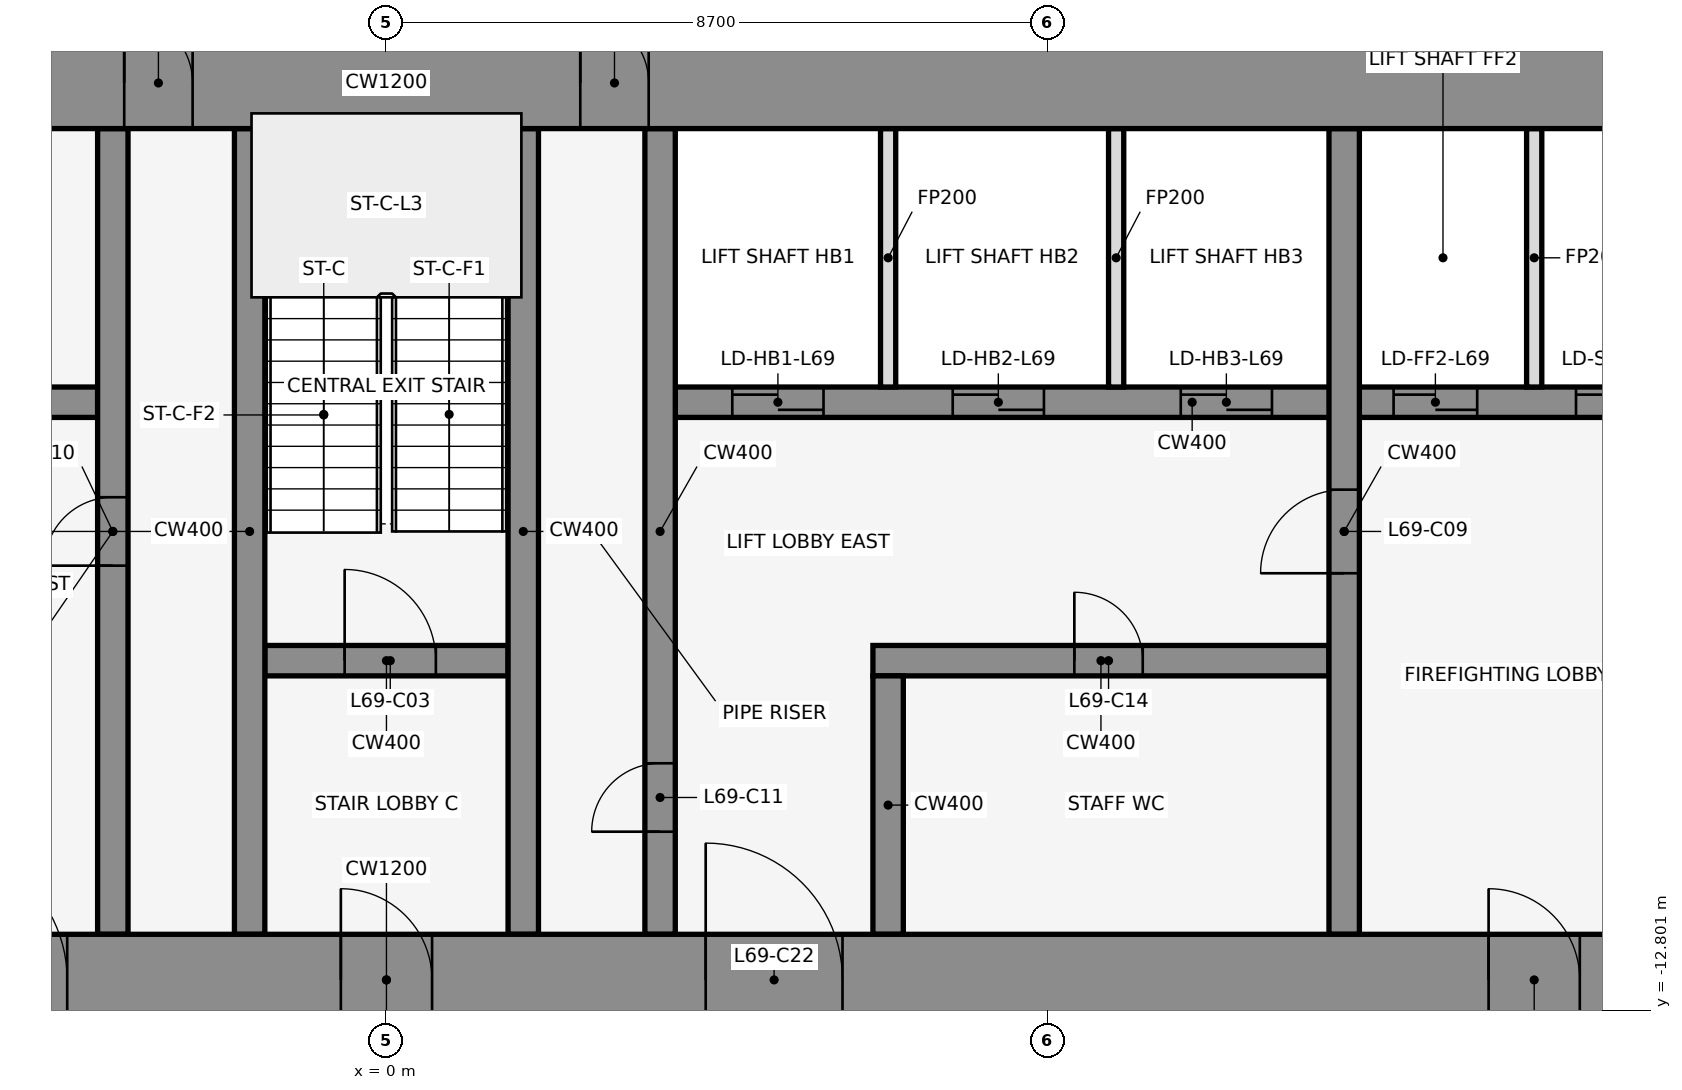
"""IFC4 building model, lengths in metres.
Left out: names, types, materials, properties, quantities, classifications, styles, units other than length and angle.
Written with IfcOpenShell. Run it as: python <this file> out.ifc"""

import sys

from ifc_helpers import new_model, si_unit, direction, frame, frame_2d, origin, place, context, subcontext, project, spatial, rectangle, extrude, element, fill, save


model = new_model("IFC4")
c1 = context("Model", 3, precision=1e-05, world=origin(), true_north=direction((0.0, 1.0)))
c2 = subcontext(c1, "Body", "Model", "MODEL_VIEW")
j1 = project(units=[si_unit("LENGTHUNIT", "METRE"), si_unit("PLANEANGLEUNIT", "RADIAN")], contexts=[c1])
p1 = place(None, origin())
s1 = spatial("IfcSite", under=j1, at=p1, CompositionType="ELEMENT")
p2 = place(p1, origin())
s2 = spatial("IfcBuilding", under=s1, at=p2, CompositionType="ELEMENT")
p3 = place(p2, frame((0.0, 0.0, 306.5)))
s3 = spatial("IfcBuildingStorey", under=s2, at=p3, CompositionType="ELEMENT", Elevation=306.5)
for number, where, z_axis, x_axis in (
    (1, (16.432, -0.105, 0.0), (0.0, 0.0, 1.0), (-0.84, 0.543, 0.0)),
    (2, (1.901, 1.08, 0.0), (0.0, 0.0, 1.0), (-0.84, -0.543, 0.0)),
    (3, (-0.068, -0.105, 0.0), (0.0, 0.0, 1.0), (-0.84, 0.543, 0.0)),
):
    element("IfcWall", number, at=place(p3, frame(where, z_axis=z_axis, x_axis=x_axis)), inside=s3, PredefinedType="STANDARD", context=c2, shape_type="SweptSolid", body=[
        extrude(rectangle(XDim=2.183, YDim=0.25, at=frame_2d((1.091, 0.0))), origin(), (0.0, 0.0, 1.0), 4.35),
    ])
p4 = place(p3, frame((-1.6, -8.2, 0.0), z_axis=(0.0, 0.0, 1.0), x_axis=(1.0, 0.0, 0.0)))
e4 = element("IfcWall", 4, at=p4, inside=s3, PredefinedType="SHEAR", context=c2, shape_type="SweptSolid", body=[
    extrude(rectangle(XDim=3.2, YDim=0.4, at=frame_2d((1.6, 0.0))), origin(), (0.0, 0.0, 1.0), 4.5),
])
p5 = place(p4, frame((1.05, 0.0, 0.0)))
e5 = element("IfcOpeningElement", 5, at=p5, cuts=e4, PredefinedType="OPENING", context=c2, shape_type="SweptSolid", body=[
    extrude(rectangle(XDim=1.2, YDim=2.1, at=frame_2d((0.6, 1.05))), frame((0.0, 0.212, 0.0), z_axis=(0.0, -1.0, 0.0), x_axis=(1.0, 0.0, 0.0)), (0.0, 0.0, 1.0), 0.424),
])
p6 = place(p3, frame((6.4, -8.2, 0.0), z_axis=(0.0, 0.0, 1.0), x_axis=(1.0, 0.0, 0.0)))
e6 = element("IfcWall", 6, at=p6, inside=s3, PredefinedType="SHEAR", context=c2, shape_type="SweptSolid", body=[
    extrude(rectangle(XDim=6.0, YDim=0.4, at=frame_2d((3.0, 0.0))), origin(), (0.0, 0.0, 1.0), 4.5),
])
p7 = place(p6, frame((2.65, 0.0, 0.0)))
e7 = element("IfcOpeningElement", 7, at=p7, cuts=e6, PredefinedType="OPENING", context=c2, shape_type="SweptSolid", body=[
    extrude(rectangle(XDim=0.9, YDim=2.1, at=frame_2d((0.45, 1.05))), frame((0.0, 0.212, 0.0), z_axis=(0.0, -1.0, 0.0), x_axis=(1.0, 0.0, 0.0)), (0.0, 0.0, 1.0), 0.424),
])
p8 = place(p3, frame((-17.4, -4.8, 0.0), z_axis=(0.0, 0.0, 1.0), x_axis=(1.0, 0.0, 0.0)))
e8 = element("IfcWall", 8, at=p8, inside=s3, PredefinedType="SHEAR", context=c2, shape_type="SweptSolid", body=[
    extrude(rectangle(XDim=13.6, YDim=0.4, at=frame_2d((6.8, 0.0))), origin(), (0.0, 0.0, 1.0), 4.5),
])
p9 = place(p8, frame((0.65, 0.0, 0.0)))
e9 = element("IfcOpeningElement", 9, at=p9, cuts=e8, PredefinedType="OPENING", context=c2, shape_type="SweptSolid", body=[
    extrude(rectangle(XDim=1.1, YDim=2.1, at=frame_2d((0.55, 1.05))), frame((0.0, 0.212, 0.0), z_axis=(0.0, -1.0, 0.0), x_axis=(1.0, 0.0, 0.0)), (0.0, 0.0, 1.0), 0.424),
])
p10 = place(p8, frame((2.95, 0.0, 0.0)))
e10 = element("IfcOpeningElement", 10, at=p10, cuts=e8, PredefinedType="OPENING", context=c2, shape_type="SweptSolid", body=[
    extrude(rectangle(XDim=1.1, YDim=2.1, at=frame_2d((0.55, 1.05))), frame((0.0, 0.212, 0.0), z_axis=(0.0, -1.0, 0.0), x_axis=(1.0, 0.0, 0.0)), (0.0, 0.0, 1.0), 0.424),
])
p11 = place(p8, frame((8.75, 0.0, 0.0)))
e11 = element("IfcOpeningElement", 11, at=p11, cuts=e8, PredefinedType="OPENING", context=c2, shape_type="SweptSolid", body=[
    extrude(rectangle(XDim=0.9, YDim=2.1, at=frame_2d((0.45, 1.05))), frame((0.0, 0.212, 0.0), z_axis=(0.0, -1.0, 0.0), x_axis=(1.0, 0.0, 0.0)), (0.0, 0.0, 1.0), 0.424),
])
p12 = place(p3, frame((3.8, -4.8, 0.0), z_axis=(0.0, 0.0, 1.0), x_axis=(1.0, 0.0, 0.0)))
e12 = element("IfcWall", 12, at=p12, inside=s3, PredefinedType="SHEAR", context=c2, shape_type="SweptSolid", body=[
    extrude(rectangle(XDim=13.6, YDim=0.4, at=frame_2d((6.8, 0.0))), origin(), (0.0, 0.0, 1.0), 4.5),
])
p13 = place(p12, frame((0.75, 0.0, 0.0)))
e13 = element("IfcOpeningElement", 13, at=p13, cuts=e12, PredefinedType="OPENING", context=c2, shape_type="SweptSolid", body=[
    extrude(rectangle(XDim=1.2, YDim=2.1, at=frame_2d((0.6, 1.05))), frame((0.0, 0.212, 0.0), z_axis=(0.0, -1.0, 0.0), x_axis=(1.0, 0.0, 0.0)), (0.0, 0.0, 1.0), 0.424),
])
p14 = place(p12, frame((3.65, 0.0, 0.0)))
e14 = element("IfcOpeningElement", 14, at=p14, cuts=e12, PredefinedType="OPENING", context=c2, shape_type="SweptSolid", body=[
    extrude(rectangle(XDim=1.2, YDim=2.1, at=frame_2d((0.6, 1.05))), frame((0.0, 0.212, 0.0), z_axis=(0.0, -1.0, 0.0), x_axis=(1.0, 0.0, 0.0)), (0.0, 0.0, 1.0), 0.424),
])
p15 = place(p12, frame((6.65, 0.0, 0.0)))
e15 = element("IfcOpeningElement", 15, at=p15, cuts=e12, PredefinedType="OPENING", context=c2, shape_type="SweptSolid", body=[
    extrude(rectangle(XDim=1.2, YDim=2.1, at=frame_2d((0.6, 1.05))), frame((0.0, 0.212, 0.0), z_axis=(0.0, -1.0, 0.0), x_axis=(1.0, 0.0, 0.0)), (0.0, 0.0, 1.0), 0.424),
])
p16 = place(p12, frame((9.45, 0.0, 0.0)))
e16 = element("IfcOpeningElement", 16, at=p16, cuts=e12, PredefinedType="OPENING", context=c2, shape_type="SweptSolid", body=[
    extrude(rectangle(XDim=1.1, YDim=2.1, at=frame_2d((0.55, 1.05))), frame((0.0, 0.212, 0.0), z_axis=(0.0, -1.0, 0.0), x_axis=(1.0, 0.0, 0.0)), (0.0, 0.0, 1.0), 0.424),
])
p17 = place(p12, frame((11.85, 0.0, 0.0)))
e17 = element("IfcOpeningElement", 17, at=p17, cuts=e12, PredefinedType="OPENING", context=c2, shape_type="SweptSolid", body=[
    extrude(rectangle(XDim=1.1, YDim=2.1, at=frame_2d((0.55, 1.05))), frame((0.0, 0.212, 0.0), z_axis=(0.0, -1.0, 0.0), x_axis=(1.0, 0.0, 0.0)), (0.0, 0.0, 1.0), 0.424),
])
p18 = place(p3, frame((-3.6, -11.8, 0.0), z_axis=(0.0, 0.0, 1.0), x_axis=(0.0, 1.0, 0.0)))
e18 = element("IfcWall", 18, at=p18, inside=s3, PredefinedType="SHEAR", context=c2, shape_type="SweptSolid", body=[
    extrude(rectangle(XDim=10.6, YDim=0.4, at=frame_2d((5.3, 0.0))), origin(), (0.0, 0.0, 1.0), 4.5),
])
p19 = place(p18, frame((4.85, 0.0, 0.0)))
e19 = element("IfcOpeningElement", 19, at=p19, cuts=e18, PredefinedType="OPENING", context=c2, shape_type="SweptSolid", body=[
    extrude(rectangle(XDim=0.9, YDim=2.1, at=frame_2d((0.45, 1.05))), frame((0.0, 0.212, 0.0), z_axis=(0.0, -1.0, 0.0), x_axis=(1.0, 0.0, 0.0)), (0.0, 0.0, 1.0), 0.424),
])
for number, where, z_axis, x_axis in (
    (20, (-1.8, -11.8, 0.0), (0.0, 0.0, 1.0), (0.0, 1.0, 0.0)),
    (21, (1.8, -11.8, 0.0), (0.0, 0.0, 1.0), (0.0, 1.0, 0.0)),
):
    element("IfcWall", number, at=place(p3, frame(where, z_axis=z_axis, x_axis=x_axis)), inside=s3, PredefinedType="SHEAR", context=c2, shape_type="SweptSolid", body=[
        extrude(rectangle(XDim=10.6, YDim=0.4, at=frame_2d((5.3, 0.0))), origin(), (0.0, 0.0, 1.0), 4.5),
    ])
p20 = place(p3, frame((3.6, -11.8, 0.0), z_axis=(0.0, 0.0, 1.0), x_axis=(0.0, 1.0, 0.0)))
e22 = element("IfcWall", 22, at=p20, inside=s3, PredefinedType="SHEAR", context=c2, shape_type="SweptSolid", body=[
    extrude(rectangle(XDim=10.6, YDim=0.4, at=frame_2d((5.3, 0.0))), origin(), (0.0, 0.0, 1.0), 4.5),
])
p21 = place(p20, frame((1.35, 0.0, 0.0)))
e23 = element("IfcOpeningElement", 23, at=p21, cuts=e22, PredefinedType="OPENING", context=c2, shape_type="SweptSolid", body=[
    extrude(rectangle(XDim=0.9, YDim=2.1, at=frame_2d((0.45, 1.05))), frame((0.0, 0.212, 0.0), z_axis=(0.0, -1.0, 0.0), x_axis=(1.0, 0.0, 0.0)), (0.0, 0.0, 1.0), 0.424),
])
p22 = place(p3, frame((6.6, -11.8, 0.0), z_axis=(0.0, 0.0, 1.0), x_axis=(0.0, 1.0, 0.0)))
e24 = element("IfcWall", 24, at=p22, inside=s3, PredefinedType="SHEAR", context=c2, shape_type="SweptSolid", body=[
    extrude(rectangle(XDim=3.4, YDim=0.4, at=frame_2d((1.7, 0.0))), origin(), (0.0, 0.0, 1.0), 4.5),
])
for number, where, z_axis, x_axis in (
    (25, (6.6, -4.6, 0.0), (0.0, 0.0, 1.0), (0.0, 1.0, 0.0)),
    (26, (9.6, -4.6, 0.0), (0.0, 0.0, 1.0), (0.0, 1.0, 0.0)),
):
    element("IfcWall", number, at=place(p3, frame(where, z_axis=z_axis, x_axis=x_axis)), inside=s3, PredefinedType="PARTITIONING", context=c2, shape_type="SweptSolid", body=[
        extrude(rectangle(XDim=3.4, YDim=0.2, at=frame_2d((1.7, 0.0))), origin(), (0.0, 0.0, 1.0), 3.418),
    ])
p23 = place(p3, frame((12.6, -11.8, 0.0), z_axis=(0.0, 0.0, 1.0), x_axis=(0.0, 1.0, 0.0)))
e27 = element("IfcWall", 27, at=p23, inside=s3, PredefinedType="SHEAR", context=c2, shape_type="SweptSolid", body=[
    extrude(rectangle(XDim=10.6, YDim=0.4, at=frame_2d((5.3, 0.0))), origin(), (0.0, 0.0, 1.0), 4.5),
])
p24 = place(p23, frame((4.75, 0.0, 0.0)))
e28 = element("IfcOpeningElement", 28, at=p24, cuts=e27, PredefinedType="OPENING", context=c2, shape_type="SweptSolid", body=[
    extrude(rectangle(XDim=1.1, YDim=2.1, at=frame_2d((0.55, 1.05))), frame((0.0, 0.212, 0.0), z_axis=(0.0, -1.0, 0.0), x_axis=(1.0, 0.0, 0.0)), (0.0, 0.0, 1.0), 0.424),
])
p25 = place(p3, frame((15.1, -4.6, 0.0), z_axis=(0.0, 0.0, 1.0), x_axis=(0.0, 1.0, 0.0)))
e29 = element("IfcWall", 29, at=p25, inside=s3, PredefinedType="PARTITIONING", context=c2, shape_type="SweptSolid", body=[
    extrude(rectangle(XDim=3.4, YDim=0.2, at=frame_2d((1.7, 0.0))), origin(), (0.0, 0.0, 1.0), 3.418),
])
p26 = place(p3, frame((-22.0, -0.6, 0.0), z_axis=(0.0, 0.0, 1.0), x_axis=(1.0, 0.0, 0.0)))
e30 = element("IfcWall", 30, at=p26, inside=s3, PredefinedType="SHEAR", context=c2, shape_type="SweptSolid", body=[
    extrude(rectangle(XDim=44.0, YDim=1.2, at=frame_2d((22.0, 0.0))), origin(), (0.0, 0.0, 1.0), 4.5),
])
p27 = place(p26, frame((18.55, 0.0, 0.0)))
e31 = element("IfcOpeningElement", 31, at=p27, cuts=e30, PredefinedType="OPENING", context=c2, shape_type="SweptSolid", body=[
    extrude(rectangle(XDim=0.9, YDim=2.1, at=frame_2d((0.45, 1.05))), frame((0.0, 0.612, 0.0), z_axis=(0.0, -1.0, 0.0), x_axis=(1.0, 0.0, 0.0)), (0.0, 0.0, 1.0), 1.224),
])
p28 = place(p26, frame((24.55, 0.0, 0.0)))
e32 = element("IfcOpeningElement", 32, at=p28, cuts=e30, PredefinedType="OPENING", context=c2, shape_type="SweptSolid", body=[
    extrude(rectangle(XDim=0.9, YDim=2.1, at=frame_2d((0.45, 1.05))), frame((0.0, 0.612, 0.0), z_axis=(0.0, -1.0, 0.0), x_axis=(1.0, 0.0, 0.0)), (0.0, 0.0, 1.0), 1.224),
])
p29 = place(p3, frame((-22.0, -12.4, 0.0), z_axis=(0.0, 0.0, 1.0), x_axis=(1.0, 0.0, 0.0)))
e33 = element("IfcWall", 33, at=p29, inside=s3, PredefinedType="SHEAR", context=c2, shape_type="SweptSolid", body=[
    extrude(rectangle(XDim=44.0, YDim=1.2, at=frame_2d((22.0, 0.0))), origin(), (0.0, 0.0, 1.0), 4.5),
])
p30 = place(p29, frame((2.2, 0.0, 0.0)))
e34 = element("IfcOpeningElement", 34, at=p30, cuts=e33, PredefinedType="OPENING", context=c2, shape_type="SweptSolid", body=[
    extrude(rectangle(XDim=1.2, YDim=2.1, at=frame_2d((0.6, 1.05))), frame((0.0, 0.612, 0.0), z_axis=(0.0, -1.0, 0.0), x_axis=(1.0, 0.0, 0.0)), (0.0, 0.0, 1.0), 1.224),
])
p31 = place(p29, frame((21.4, 0.0, 0.0)))
e35 = element("IfcOpeningElement", 35, at=p31, cuts=e33, PredefinedType="OPENING", context=c2, shape_type="SweptSolid", body=[
    extrude(rectangle(XDim=1.2, YDim=2.1, at=frame_2d((0.6, 1.05))), frame((0.0, 0.612, 0.0), z_axis=(0.0, -1.0, 0.0), x_axis=(1.0, 0.0, 0.0)), (0.0, 0.0, 1.0), 1.224),
])
p32 = place(p29, frame((40.6, 0.0, 0.0)))
e36 = element("IfcOpeningElement", 36, at=p32, cuts=e33, PredefinedType="OPENING", context=c2, shape_type="SweptSolid", body=[
    extrude(rectangle(XDim=1.2, YDim=2.1, at=frame_2d((0.6, 1.05))), frame((0.0, 0.612, 0.0), z_axis=(0.0, -1.0, 0.0), x_axis=(1.0, 0.0, 0.0)), (0.0, 0.0, 1.0), 1.224),
])
p33 = place(p29, frame((16.0, 0.0, 0.0)))
e37 = element("IfcOpeningElement", 37, at=p33, cuts=e33, PredefinedType="OPENING", context=c2, shape_type="SweptSolid", body=[
    extrude(rectangle(XDim=1.8, YDim=2.1, at=frame_2d((0.9, 1.05))), frame((0.0, 0.612, 0.0), z_axis=(0.0, -1.0, 0.0), x_axis=(1.0, 0.0, 0.0)), (0.0, 0.0, 1.0), 1.224),
])
p34 = place(p29, frame((6.3, 0.0, 0.0)))
e38 = element("IfcOpeningElement", 38, at=p34, cuts=e33, PredefinedType="OPENING", context=c2, shape_type="SweptSolid", body=[
    extrude(rectangle(XDim=1.2, YDim=2.1, at=frame_2d((0.6, 1.05))), frame((0.0, 0.612, 0.0), z_axis=(0.0, -1.0, 0.0), x_axis=(1.0, 0.0, 0.0)), (0.0, 0.0, 1.0), 1.224),
])
p35 = place(p29, frame((26.2, 0.0, 0.0)))
e39 = element("IfcOpeningElement", 39, at=p35, cuts=e33, PredefinedType="OPENING", context=c2, shape_type="SweptSolid", body=[
    extrude(rectangle(XDim=1.8, YDim=2.1, at=frame_2d((0.9, 1.05))), frame((0.0, 0.612, 0.0), z_axis=(0.0, -1.0, 0.0), x_axis=(1.0, 0.0, 0.0)), (0.0, 0.0, 1.0), 1.224),
])
p36 = place(p29, frame((36.5, 0.0, 0.0)))
e40 = element("IfcOpeningElement", 40, at=p36, cuts=e33, PredefinedType="OPENING", context=c2, shape_type="SweptSolid", body=[
    extrude(rectangle(XDim=1.2, YDim=2.1, at=frame_2d((0.6, 1.05))), frame((0.0, 0.612, 0.0), z_axis=(0.0, -1.0, 0.0), x_axis=(1.0, 0.0, 0.0)), (0.0, 0.0, 1.0), 1.224),
])
p37 = place(p5, origin())
e41 = element("IfcDoor", 41, at=p37, inside=s3, OperationType="SINGLE_SWING_LEFT", PredefinedType="DOOR", context=c2, shape_type="SweptSolid", body=[
    extrude(rectangle(XDim=1.2, YDim=2.1, at=frame_2d((0.6, 1.05))), frame((0.0, 0.025, 0.0), z_axis=(0.0, -1.0, 0.0), x_axis=(1.0, 0.0, 0.0)), (0.0, 0.0, 1.0), 0.05),
])
fill(e5, e41)
p38 = place(p13, origin())
e42 = element("IfcDoor", 42, at=p38, inside=s3, OperationType="DOUBLE_DOOR_SLIDING", PredefinedType="DOOR", context=c2, shape_type="SweptSolid", body=[
    extrude(rectangle(XDim=1.2, YDim=2.1, at=frame_2d((0.6, 1.05))), frame((0.0, 0.025, 0.0), z_axis=(0.0, -1.0, 0.0), x_axis=(1.0, 0.0, 0.0)), (0.0, 0.0, 1.0), 0.05),
])
fill(e13, e42)
p39 = place(p14, origin())
e43 = element("IfcDoor", 43, at=p39, inside=s3, OperationType="DOUBLE_DOOR_SLIDING", PredefinedType="DOOR", context=c2, shape_type="SweptSolid", body=[
    extrude(rectangle(XDim=1.2, YDim=2.1, at=frame_2d((0.6, 1.05))), frame((0.0, 0.025, 0.0), z_axis=(0.0, -1.0, 0.0), x_axis=(1.0, 0.0, 0.0)), (0.0, 0.0, 1.0), 0.05),
])
fill(e14, e43)
p40 = place(p15, origin())
e44 = element("IfcDoor", 44, at=p40, inside=s3, OperationType="DOUBLE_DOOR_SLIDING", PredefinedType="DOOR", context=c2, shape_type="SweptSolid", body=[
    extrude(rectangle(XDim=1.2, YDim=2.1, at=frame_2d((0.6, 1.05))), frame((0.0, 0.025, 0.0), z_axis=(0.0, -1.0, 0.0), x_axis=(1.0, 0.0, 0.0)), (0.0, 0.0, 1.0), 0.05),
])
fill(e15, e44)
p41 = place(p16, origin())
e45 = element("IfcDoor", 45, at=p41, inside=s3, OperationType="DOUBLE_DOOR_SLIDING", PredefinedType="DOOR", context=c2, shape_type="SweptSolid", body=[
    extrude(rectangle(XDim=1.1, YDim=2.1, at=frame_2d((0.55, 1.05))), frame((0.0, 0.025, 0.0), z_axis=(0.0, -1.0, 0.0), x_axis=(1.0, 0.0, 0.0)), (0.0, 0.0, 1.0), 0.05),
])
fill(e16, e45)
p42 = place(p17, origin())
e46 = element("IfcDoor", 46, at=p42, inside=s3, OperationType="DOUBLE_DOOR_SLIDING", PredefinedType="DOOR", context=c2, shape_type="SweptSolid", body=[
    extrude(rectangle(XDim=1.1, YDim=2.1, at=frame_2d((0.55, 1.05))), frame((0.0, 0.025, 0.0), z_axis=(0.0, -1.0, 0.0), x_axis=(1.0, 0.0, 0.0)), (0.0, 0.0, 1.0), 0.05),
])
fill(e17, e46)
p43 = place(p24, frame((1.1, 0.0, 0.0), z_axis=(0.0, 0.0, 1.0), x_axis=(-1.0, 0.0, 0.0)))
e47 = element("IfcDoor", 47, at=p43, inside=s3, OperationType="SINGLE_SWING_RIGHT", PredefinedType="DOOR", context=c2, shape_type="SweptSolid", body=[
    extrude(rectangle(XDim=1.1, YDim=2.1, at=frame_2d((0.55, 1.05))), frame((0.0, 0.025, 0.0), z_axis=(0.0, -1.0, 0.0), x_axis=(1.0, 0.0, 0.0)), (0.0, 0.0, 1.0), 0.05),
])
fill(e28, e47)
p44 = place(p19, frame((0.9, 0.0, 0.0), z_axis=(0.0, 0.0, 1.0), x_axis=(-1.0, 0.0, 0.0)))
e48 = element("IfcDoor", 48, at=p44, inside=s3, OperationType="SINGLE_SWING_LEFT", PredefinedType="DOOR", context=c2, shape_type="SweptSolid", body=[
    extrude(rectangle(XDim=0.9, YDim=2.1, at=frame_2d((0.45, 1.05))), frame((0.0, 0.025, 0.0), z_axis=(0.0, -1.0, 0.0), x_axis=(1.0, 0.0, 0.0)), (0.0, 0.0, 1.0), 0.05),
])
fill(e19, e48)
p45 = place(p21, origin())
e49 = element("IfcDoor", 49, at=p45, inside=s3, OperationType="SINGLE_SWING_LEFT", PredefinedType="DOOR", context=c2, shape_type="SweptSolid", body=[
    extrude(rectangle(XDim=0.9, YDim=2.1, at=frame_2d((0.45, 1.05))), frame((0.0, 0.025, 0.0), z_axis=(0.0, -1.0, 0.0), x_axis=(1.0, 0.0, 0.0)), (0.0, 0.0, 1.0), 0.05),
])
fill(e23, e49)
p46 = place(p7, frame((0.9, 0.0, 0.0), z_axis=(0.0, 0.0, 1.0), x_axis=(-1.0, 0.0, 0.0)))
e50 = element("IfcDoor", 50, at=p46, inside=s3, OperationType="SINGLE_SWING_LEFT", PredefinedType="DOOR", context=c2, shape_type="SweptSolid", body=[
    extrude(rectangle(XDim=0.9, YDim=2.1, at=frame_2d((0.45, 1.05))), frame((0.0, 0.025, 0.0), z_axis=(0.0, -1.0, 0.0), x_axis=(1.0, 0.0, 0.0)), (0.0, 0.0, 1.0), 0.05),
])
fill(e7, e50)
p47 = place(p27, origin())
e51 = element("IfcDoor", 51, at=p47, inside=s3, OperationType="SINGLE_SWING_LEFT", PredefinedType="DOOR", context=c2, shape_type="SweptSolid", body=[
    extrude(rectangle(XDim=0.9, YDim=2.1, at=frame_2d((0.45, 1.05))), frame((0.0, 0.025, 0.0), z_axis=(0.0, -1.0, 0.0), x_axis=(1.0, 0.0, 0.0)), (0.0, 0.0, 1.0), 0.05),
])
fill(e31, e51)
p48 = place(p28, origin())
e52 = element("IfcDoor", 52, at=p48, inside=s3, OperationType="SINGLE_SWING_LEFT", PredefinedType="DOOR", context=c2, shape_type="SweptSolid", body=[
    extrude(rectangle(XDim=0.9, YDim=2.1, at=frame_2d((0.45, 1.05))), frame((0.0, 0.025, 0.0), z_axis=(0.0, -1.0, 0.0), x_axis=(1.0, 0.0, 0.0)), (0.0, 0.0, 1.0), 0.05),
])
fill(e32, e52)
p49 = place(p31, frame((1.2, 0.0, 0.0), z_axis=(0.0, 0.0, 1.0), x_axis=(-1.0, 0.0, 0.0)))
e53 = element("IfcDoor", 53, at=p49, inside=s3, OperationType="SINGLE_SWING_RIGHT", PredefinedType="DOOR", context=c2, shape_type="SweptSolid", body=[
    extrude(rectangle(XDim=1.2, YDim=2.1, at=frame_2d((0.6, 1.05))), frame((0.0, 0.025, 0.0), z_axis=(0.0, -1.0, 0.0), x_axis=(1.0, 0.0, 0.0)), (0.0, 0.0, 1.0), 0.05),
])
fill(e35, e53)
p50 = place(p33, origin())
e54 = element("IfcDoor", 54, at=p50, inside=s3, OperationType="SINGLE_SWING_LEFT", PredefinedType="DOOR", context=c2, shape_type="SweptSolid", body=[
    extrude(rectangle(XDim=1.8, YDim=2.1, at=frame_2d((0.9, 1.05))), frame((0.0, 0.025, 0.0), z_axis=(0.0, -1.0, 0.0), x_axis=(1.0, 0.0, 0.0)), (0.0, 0.0, 1.0), 0.05),
])
fill(e37, e54)
p51 = place(p35, origin())
e55 = element("IfcDoor", 55, at=p51, inside=s3, OperationType="SINGLE_SWING_LEFT", PredefinedType="DOOR", context=c2, shape_type="SweptSolid", body=[
    extrude(rectangle(XDim=1.8, YDim=2.1, at=frame_2d((0.9, 1.05))), frame((0.0, 0.025, 0.0), z_axis=(0.0, -1.0, 0.0), x_axis=(1.0, 0.0, 0.0)), (0.0, 0.0, 1.0), 0.05),
])
fill(e39, e55)
p52 = place(p36, frame((1.2, 0.0, 0.0), z_axis=(0.0, 0.0, 1.0), x_axis=(-1.0, 0.0, 0.0)))
e56 = element("IfcDoor", 56, at=p52, inside=s3, OperationType="SINGLE_SWING_RIGHT", PredefinedType="DOOR", context=c2, shape_type="SweptSolid", body=[
    extrude(rectangle(XDim=1.2, YDim=2.1, at=frame_2d((0.6, 1.05))), frame((0.0, 0.025, 0.0), z_axis=(0.0, -1.0, 0.0), x_axis=(1.0, 0.0, 0.0)), (0.0, 0.0, 1.0), 0.05),
])
fill(e40, e56)
save(model, sys.argv[1])
